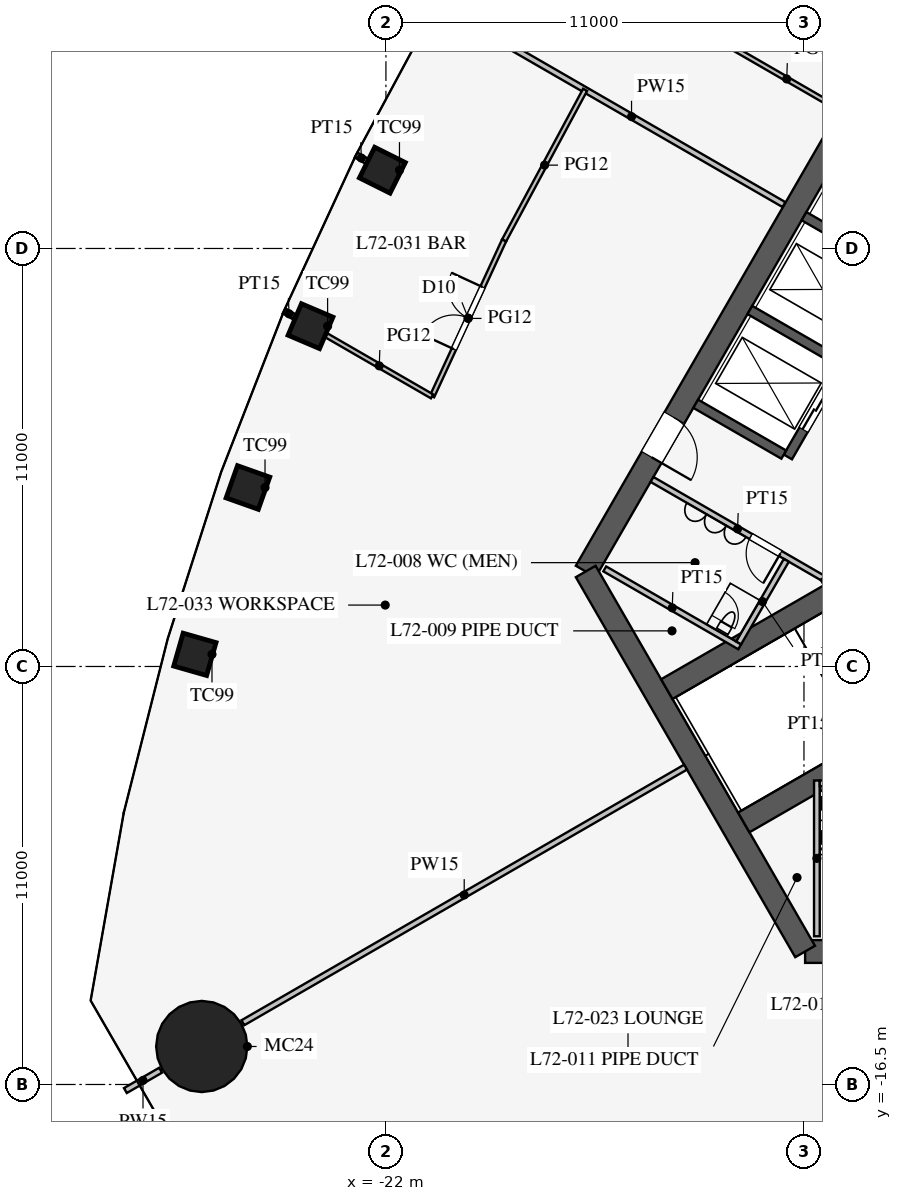
"""IFC4 building model, lengths in metres.
Left out: names, types, materials, properties, quantities, classifications, styles, units other than length and angle.
Written with IfcOpenShell. Run it as: python <this file> out.ifc"""

import sys

from ifc_helpers import new_model, si_unit, direction, frame, frame_2d, origin, origin_2d, place, context, subcontext, project, spatial, rectangle, circle, extrude, element, fill, save


model = new_model("IFC4")
c1 = context("Model", 3, precision=1e-05, world=origin(), true_north=direction((0.0, 1.0)))
c2 = subcontext(c1, "Body", "Model", "MODEL_VIEW")
j1 = project(units=[si_unit("LENGTHUNIT", "METRE"), si_unit("PLANEANGLEUNIT", "RADIAN")], contexts=[c1])
p1 = place(None, origin())
s1 = spatial("IfcSite", under=j1, at=p1, CompositionType="ELEMENT")
p2 = place(p1, origin())
s2 = spatial("IfcBuilding", under=s1, at=p2, CompositionType="ELEMENT")
p3 = place(p2, frame((0.0, 0.0, 314.1)))
s3 = spatial("IfcBuildingStorey", under=s2, at=p3, CompositionType="ELEMENT", Elevation=314.1)
for number, where, z_axis, x_axis in (
    (1, (-22.094, 7.56, 0.0), (0.0, 0.0, 1.0), (-0.447, -0.895, 0.0)),
    (2, (-23.985, 3.455, 0.0), (0.0, 0.0, 1.0), (-0.391, -0.92, 0.0)),
    (3, (-25.632, -0.79, 0.0), (0.0, 0.0, 1.0), (-0.334, -0.942, 0.0)),
    (4, (-27.027, -5.18, 0.0), (0.0, 0.0, 1.0), (-0.275, -0.961, 0.0)),
):
    element("IfcColumn", number, at=place(p3, frame(where, z_axis=z_axis, x_axis=x_axis)), inside=s3, PredefinedType="COLUMN", context=c2, shape_type="SweptSolid", body=[
        extrude(rectangle(XDim=0.9, YDim=0.9, at=origin_2d()), origin(), (0.0, 0.0, 1.0), 4.2),
    ])
p4 = place(p3, frame((-26.847, -15.5, 0.0), z_axis=(0.0, 0.0, 1.0), x_axis=(1.0, 0.0, 0.0)))
e5 = element("IfcColumn", 5, at=p4, inside=s3, PredefinedType="COLUMN", context=c2, shape_type="SweptSolid", body=[
    extrude(circle(Radius=1.2, at=origin_2d()), origin(), (0.0, 0.0, 1.0), 4.2),
])
p5 = place(p3, frame((-10.97, -13.0, 0.0), z_axis=(0.0, 0.0, 1.0), x_axis=(1.0, 0.0, 0.0)))
e6 = element("IfcWall", 6, at=p5, inside=s3, PredefinedType="SHEAR", context=c2, shape_type="SweptSolid", body=[
    extrude(rectangle(XDim=21.939, YDim=0.6, at=frame_2d((10.97, 0.0))), origin(), (0.0, 0.0, 1.0), 4.2),
])
p6 = place(p5, frame((17.27, 0.0, 0.0)))
e7 = element("IfcOpeningElement", 7, at=p6, cuts=e6, PredefinedType="OPENING", context=c2, shape_type="SweptSolid", body=[
    extrude(rectangle(XDim=1.2, YDim=2.1, at=frame_2d((0.6, 1.05))), frame((0.0, 0.31, 0.0), z_axis=(0.0, -1.0, 0.0), x_axis=(1.0, 0.0, 0.0)), (0.0, 0.0, 1.0), 0.62),
])
p7 = place(p5, frame((3.47, 0.0, 0.0)))
e8 = element("IfcOpeningElement", 8, at=p7, cuts=e6, PredefinedType="OPENING", context=c2, shape_type="SweptSolid", body=[
    extrude(rectangle(XDim=1.2, YDim=2.1, at=frame_2d((0.6, 1.05))), frame((0.0, 0.31, 0.0), z_axis=(0.0, -1.0, 0.0), x_axis=(1.0, 0.0, 0.0)), (0.0, 0.0, 1.0), 0.62),
])
p8 = place(p3, frame((-5.773, 16.0, 0.0), z_axis=(0.0, 0.0, 1.0), x_axis=(-0.500002442456, -0.866023993627, 0.0)))
e9 = element("IfcWall", 9, at=p8, inside=s3, PredefinedType="SHEAR", context=c2, shape_type="SweptSolid", body=[
    extrude(rectangle(XDim=21.939, YDim=0.6, at=frame_2d((10.97, 0.0))), origin(), (0.0, 0.0, 1.0), 4.2),
])
p9 = place(p8, frame((17.27, 0.0, 0.0)))
e10 = element("IfcOpeningElement", 10, at=p9, cuts=e9, PredefinedType="OPENING", context=c2, shape_type="SweptSolid", body=[
    extrude(rectangle(XDim=1.2, YDim=2.1, at=frame_2d((0.6, 1.05))), frame((0.0, 0.31, 0.0), z_axis=(0.0, -1.0, 0.0), x_axis=(1.0, 0.0, 0.0)), (0.0, 0.0, 1.0), 0.62),
])
p10 = place(p8, frame((3.47, 0.0, 0.0)))
e11 = element("IfcOpeningElement", 11, at=p10, cuts=e9, PredefinedType="OPENING", context=c2, shape_type="SweptSolid", body=[
    extrude(rectangle(XDim=1.2, YDim=2.1, at=frame_2d((0.6, 1.05))), frame((0.0, 0.31, 0.0), z_axis=(0.0, -1.0, 0.0), x_axis=(1.0, 0.0, 0.0)), (0.0, 0.0, 1.0), 0.62),
])
p11 = place(p3, frame((-16.743, -3.0, 0.0), z_axis=(0.0, 0.0, 1.0), x_axis=(0.499995765644, -0.866027848477, 0.0)))
e12 = element("IfcWall", 12, at=p11, inside=s3, PredefinedType="SHEAR", context=c2, shape_type="SweptSolid", body=[
    extrude(rectangle(XDim=11.547, YDim=0.6, at=frame_2d((5.773, 0.0))), origin(), (0.0, 0.0, 1.0), 4.2),
])
p12 = place(p3, frame((-5.724, 9.886, 0.0), z_axis=(0.0, 0.0, 1.0), x_axis=(-0.500001763848, -0.866024385424, 0.0)))
e13 = element("IfcWall", 13, at=p12, inside=s3, PredefinedType="SHEAR", context=c2, shape_type="SweptSolid", body=[
    extrude(rectangle(XDim=11.4, YDim=0.25, at=frame_2d((5.7, 0.0))), origin(), (0.0, 0.0, 1.0), 4.2),
])
p13 = place(p12, frame((6.525, 0.0, 0.0)))
e14 = element("IfcOpeningElement", 14, at=p13, cuts=e13, PredefinedType="OPENING", context=c2, shape_type="SweptSolid", body=[
    extrude(rectangle(XDim=1.2, YDim=2.2, at=frame_2d((0.6, 1.1))), frame((0.0, 0.135, 0.0), z_axis=(0.0, -1.0, 0.0), x_axis=(1.0, 0.0, 0.0)), (0.0, 0.0, 1.0), 0.27),
])
p14 = place(p12, frame((9.375, 0.0, 0.0)))
e15 = element("IfcOpeningElement", 15, at=p14, cuts=e13, PredefinedType="OPENING", context=c2, shape_type="SweptSolid", body=[
    extrude(rectangle(XDim=1.2, YDim=2.2, at=frame_2d((0.6, 1.1))), frame((0.0, 0.135, 0.0), z_axis=(0.0, -1.0, 0.0), x_axis=(1.0, 0.0, 0.0)), (0.0, 0.0, 1.0), 0.27),
])
for number, where, z_axis, x_axis in (
    (16, (-8.682, 5.012, 0.0), (0.0, 0.0, 1.0), (-0.866, 0.5, 0.0)),
    (17, (-10.107, 2.544, 0.0), (0.0, 0.0, 1.0), (-0.866, 0.5, 0.0)),
    (18, (-11.532, 0.076, 0.0), (0.0, 0.0, 1.0), (-0.866, 0.5, 0.0)),
):
    element("IfcWall", number, at=place(p3, frame(where, z_axis=z_axis, x_axis=x_axis)), inside=s3, PredefinedType="SHEAR", context=c2, shape_type="SweptSolid", body=[
        extrude(rectangle(XDim=2.675, YDim=0.25, at=frame_2d((1.337, 0.0))), origin(), (0.0, 0.0, 1.0), 4.2),
    ])
p15 = place(p3, frame((-6.663, -1.509, 0.0), z_axis=(0.0, 0.0, 1.0), x_axis=(-0.86603049496, -0.499991181721, 0.0)))
e19 = element("IfcWall", 19, at=p15, inside=s3, PredefinedType="SHEAR", context=c2, shape_type="SweptSolid", body=[
    extrude(rectangle(XDim=9.175, YDim=0.6, at=frame_2d((4.587, 0.0))), origin(), (0.0, 0.0, 1.0), 4.2),
])
p16 = place(p3, frame((-4.638, -5.016, 0.0), z_axis=(0.0, 0.0, 1.0), x_axis=(-0.866012320003, -0.50002266109, 0.0)))
e20 = element("IfcWall", 20, at=p16, inside=s3, PredefinedType="SHEAR", context=c2, shape_type="SweptSolid", body=[
    extrude(rectangle(XDim=9.175, YDim=0.6, at=frame_2d((4.587, 0.0))), origin(), (0.0, 0.0, 1.0), 4.2),
])
p17 = place(p3, frame((-10.495, -3.178, 0.0), z_axis=(0.0, 0.0, 1.0), x_axis=(-0.866021400173, 0.500006934395, 0.0)))
e21 = element("IfcWall", 21, at=p17, inside=s3, PredefinedType="PARTITIONING", context=c2, shape_type="SweptSolid", body=[
    extrude(rectangle(XDim=5.2, YDim=0.15, at=frame_2d((2.6, 0.0))), origin(), (0.0, 0.0, 1.0), 4.0),
])
p18 = place(p17, frame((1.3, 0.0, 0.0)))
e22 = element("IfcOpeningElement", 22, at=p18, cuts=e21, PredefinedType="OPENING", context=c2, shape_type="SweptSolid", body=[
    extrude(rectangle(XDim=0.9, YDim=2.1, at=frame_2d((0.45, 1.05))), frame((0.0, 0.085, 0.0), z_axis=(0.0, -1.0, 0.0), x_axis=(1.0, 0.0, 0.0)), (0.0, 0.0, 1.0), 0.17),
])
p19 = place(p3, frame((-10.495, -3.178, 0.0), z_axis=(0.0, 0.0, 1.0), x_axis=(0.499842556608, -0.866116284689, 0.0)))
e23 = element("IfcWall", 23, at=p19, inside=s3, PredefinedType="PARTITIONING", context=c2, shape_type="SweptSolid", body=[
    extrude(rectangle(XDim=0.645, YDim=0.15, at=frame_2d((0.323, 0.0))), origin(), (0.0, 0.0, 1.0), 4.0),
])
p20 = place(p3, frame((-12.691, -4.982, 0.0), z_axis=(0.0, 0.0, 1.0), x_axis=(-0.8660249478, 0.500000789788, 0.0)))
e24 = element("IfcWall", 24, at=p20, inside=s3, PredefinedType="PARTITIONING", context=c2, shape_type="SweptSolid", body=[
    extrude(rectangle(XDim=4.1, YDim=0.15, at=frame_2d((2.05, 0.0))), origin(), (0.0, 0.0, 1.0), 4.0),
])
p21 = place(p3, frame((-11.464, -2.706, 0.0), z_axis=(0.0, 0.0, 1.0), x_axis=(-0.50001992892, -0.866013897511, 0.0)))
e25 = element("IfcWall", 25, at=p21, inside=s3, PredefinedType="PARTITIONING", context=c2, shape_type="SweptSolid", body=[
    extrude(rectangle(XDim=2.51, YDim=0.15, at=frame_2d((1.255, 0.0))), origin(), (0.0, 0.0, 1.0), 4.0),
])
p22 = place(p3, frame((-10.66, -8.5, 0.0), z_axis=(0.0, 0.0, 1.0), x_axis=(0.0, -1.0, 0.0)))
e26 = element("IfcWall", 26, at=p22, inside=s3, PredefinedType="PARTITIONING", context=c2, shape_type="SweptSolid", body=[
    extrude(rectangle(XDim=4.1, YDim=0.15, at=frame_2d((2.05, 0.0))), origin(), (0.0, 0.0, 1.0), 4.0),
])
p23 = place(p3, frame((-8.075, -8.575, 0.0), z_axis=(0.0, 0.0, 1.0), x_axis=(-1.0, 0.0, 0.0)))
e27 = element("IfcWall", 27, at=p23, inside=s3, PredefinedType="PARTITIONING", context=c2, shape_type="SweptSolid", body=[
    extrude(rectangle(XDim=2.51, YDim=0.15, at=frame_2d((1.255, 0.0))), origin(), (0.0, 0.0, 1.0), 4.0),
])
p24 = place(p3, frame((-14.116, -8.15, 0.0), z_axis=(0.0, 0.0, 1.0), x_axis=(-0.866020541135, -0.500008422262, 0.0)))
e28 = element("IfcWall", 28, at=p24, inside=s3, PredefinedType="PARTITIONING", context=c2, shape_type="SweptSolid", body=[
    extrude(rectangle(XDim=13.45, YDim=0.15, at=frame_2d((6.725, 0.0))), origin(), (0.0, 0.0, 1.0), 2.5),
])
p25 = place(p3, frame((-27.929, -16.125, 0.0), z_axis=(0.0, 0.0, 1.0), x_axis=(-0.866086810508, -0.499893625349, 0.0)))
e29 = element("IfcWall", 29, at=p25, inside=s3, PredefinedType="PARTITIONING", context=c2, shape_type="SweptSolid", body=[
    extrude(rectangle(XDim=1.07, YDim=0.15, at=frame_2d((0.535, 0.0))), origin(), (0.0, 0.0, 1.0), 2.5),
])
p26 = place(p3, frame((-11.527, 6.655, 0.0), z_axis=(0.0, 0.0, 1.0), x_axis=(-0.866021846952, 0.500006160563, 0.0)))
e30 = element("IfcWall", 30, at=p26, inside=s3, PredefinedType="PARTITIONING", context=c2, shape_type="SweptSolid", body=[
    extrude(rectangle(XDim=9.262, YDim=0.15, at=frame_2d((4.631, 0.0))), origin(), (0.0, 0.0, 1.0), 3.3),
])
p27 = place(p3, frame((-10.068, 9.161, 0.0), z_axis=(0.0, 0.0, 1.0), x_axis=(-0.866008981251, 0.500028443584, 0.0)))
e31 = element("IfcWall", 31, at=p27, inside=s3, PredefinedType="PARTITIONING", context=c2, shape_type="SweptSolid", body=[
    extrude(rectangle(XDim=3.2, YDim=0.12, at=frame_2d((1.6, 0.0))), origin(), (0.0, 0.0, 1.0), 2.9),
])
p28 = place(p3, frame((-22.51, 7.8, 0.0), z_axis=(0.0, 0.0, 1.0), x_axis=(-0.866095534226, 0.499878510834, 0.0)))
e32 = element("IfcWall", 32, at=p28, inside=s3, PredefinedType="PARTITIONING", context=c2, shape_type="SweptSolid", body=[
    extrude(rectangle(XDim=0.316, YDim=0.15, at=frame_2d((0.158, 0.0))), origin(), (0.0, 0.0, 1.0), 2.9),
])
p29 = place(p3, frame((-24.422, 3.708, 0.0), z_axis=(0.0, 0.0, 1.0), x_axis=(-0.866254317358, 0.499603300288, 0.0)))
e33 = element("IfcWall", 33, at=p29, inside=s3, PredefinedType="PARTITIONING", context=c2, shape_type="SweptSolid", body=[
    extrude(rectangle(XDim=0.296, YDim=0.15, at=frame_2d((0.148, 0.0))), origin(), (0.0, 0.0, 1.0), 2.9),
])
p30 = place(p3, frame((-16.759, 9.676, 0.0), z_axis=(0.0, 0.0, 1.0), x_axis=(-0.473524102582, -0.880780860529, 0.0)))
e34 = element("IfcWall", 34, at=p30, inside=s3, PredefinedType="PARTITIONING", context=c2, shape_type="SweptSolid", body=[
    extrude(rectangle(XDim=4.502, YDim=0.12, at=frame_2d((2.251, 0.0))), origin(), (0.0, 0.0, 1.0), 2.9),
])
p31 = place(p3, frame((-18.891, 5.71, 0.0), z_axis=(0.0, 0.0, 1.0), x_axis=(-0.419335693458, -0.907831248742, 0.0)))
e35 = element("IfcWall", 35, at=p31, inside=s3, PredefinedType="PARTITIONING", context=c2, shape_type="SweptSolid", body=[
    extrude(rectangle(XDim=4.519, YDim=0.12, at=frame_2d((2.259, 0.0))), origin(), (0.0, 0.0, 1.0), 2.9),
])
p32 = place(p31, frame((1.35, 0.0, 0.15)))
e36 = element("IfcOpeningElement", 36, at=p32, cuts=e35, PredefinedType="OPENING", context=c2, shape_type="SweptSolid", body=[
    extrude(rectangle(XDim=1.8, YDim=2.1, at=frame_2d((0.9, 1.05))), frame((0.0, 0.07, 0.0), z_axis=(0.0, -1.0, 0.0), x_axis=(1.0, 0.0, 0.0)), (0.0, 0.0, 1.0), 0.14),
])
p33 = place(p3, frame((-20.786, 1.608, 0.0), z_axis=(0.0, 0.0, 1.0), x_axis=(-0.866039964284, 0.499974779627, 0.0)))
e37 = element("IfcWall", 37, at=p33, inside=s3, PredefinedType="PARTITIONING", context=c2, shape_type="SweptSolid", body=[
    extrude(rectangle(XDim=3.211, YDim=0.12, at=frame_2d((1.605, 0.0))), origin(), (0.0, 0.0, 1.0), 2.9),
])
p34 = place(p18, origin())
e38 = element("IfcDoor", 38, at=p34, inside=s3, OperationType="SINGLE_SWING_LEFT", PredefinedType="DOOR", context=c2, shape_type="SweptSolid", body=[
    extrude(rectangle(XDim=0.9, YDim=2.1, at=frame_2d((0.45, 1.05))), frame((0.0, 0.025, 0.0), z_axis=(0.0, -1.0, 0.0), x_axis=(1.0, 0.0, 0.0)), (0.0, 0.0, 1.0), 0.05),
])
fill(e22, e38)
p35 = place(p9, origin())
e39 = element("IfcDoor", 39, at=p35, inside=s3, OperationType="SINGLE_SWING_RIGHT", PredefinedType="DOOR", context=c2, shape_type="SweptSolid", body=[
    extrude(rectangle(XDim=1.2, YDim=2.1, at=frame_2d((0.6, 1.05))), frame((0.0, 0.025, 0.0), z_axis=(0.0, -1.0, 0.0), x_axis=(1.0, 0.0, 0.0)), (0.0, 0.0, 1.0), 0.05),
])
fill(e10, e39)
p36 = place(p32, frame((1.8, 0.0, 0.0), z_axis=(0.0, 0.0, 1.0), x_axis=(-1.0, 0.0, 0.0)))
e40 = element("IfcDoor", 40, at=p36, inside=s3, OperationType="DOUBLE_DOOR_SINGLE_SWING", PredefinedType="DOOR", context=c2, shape_type="SweptSolid", body=[
    extrude(rectangle(XDim=1.8, YDim=2.1, at=frame_2d((0.9, 1.05))), frame((0.0, 0.025, 0.0), z_axis=(0.0, -1.0, 0.0), x_axis=(1.0, 0.0, 0.0)), (0.0, 0.0, 1.0), 0.05),
])
fill(e36, e40)
p37 = place(p14, origin())
e41 = element("IfcDoor", 41, at=p37, inside=s3, OperationType="DOUBLE_DOOR_SLIDING", PredefinedType="DOOR", context=c2, shape_type="SweptSolid", body=[
    extrude(rectangle(XDim=1.2, YDim=2.2, at=frame_2d((0.6, 1.1))), frame((0.0, 0.025, 0.0), z_axis=(0.0, -1.0, 0.0), x_axis=(1.0, 0.0, 0.0)), (0.0, 0.0, 1.0), 0.05),
])
fill(e15, e41)
save(model, sys.argv[1])
